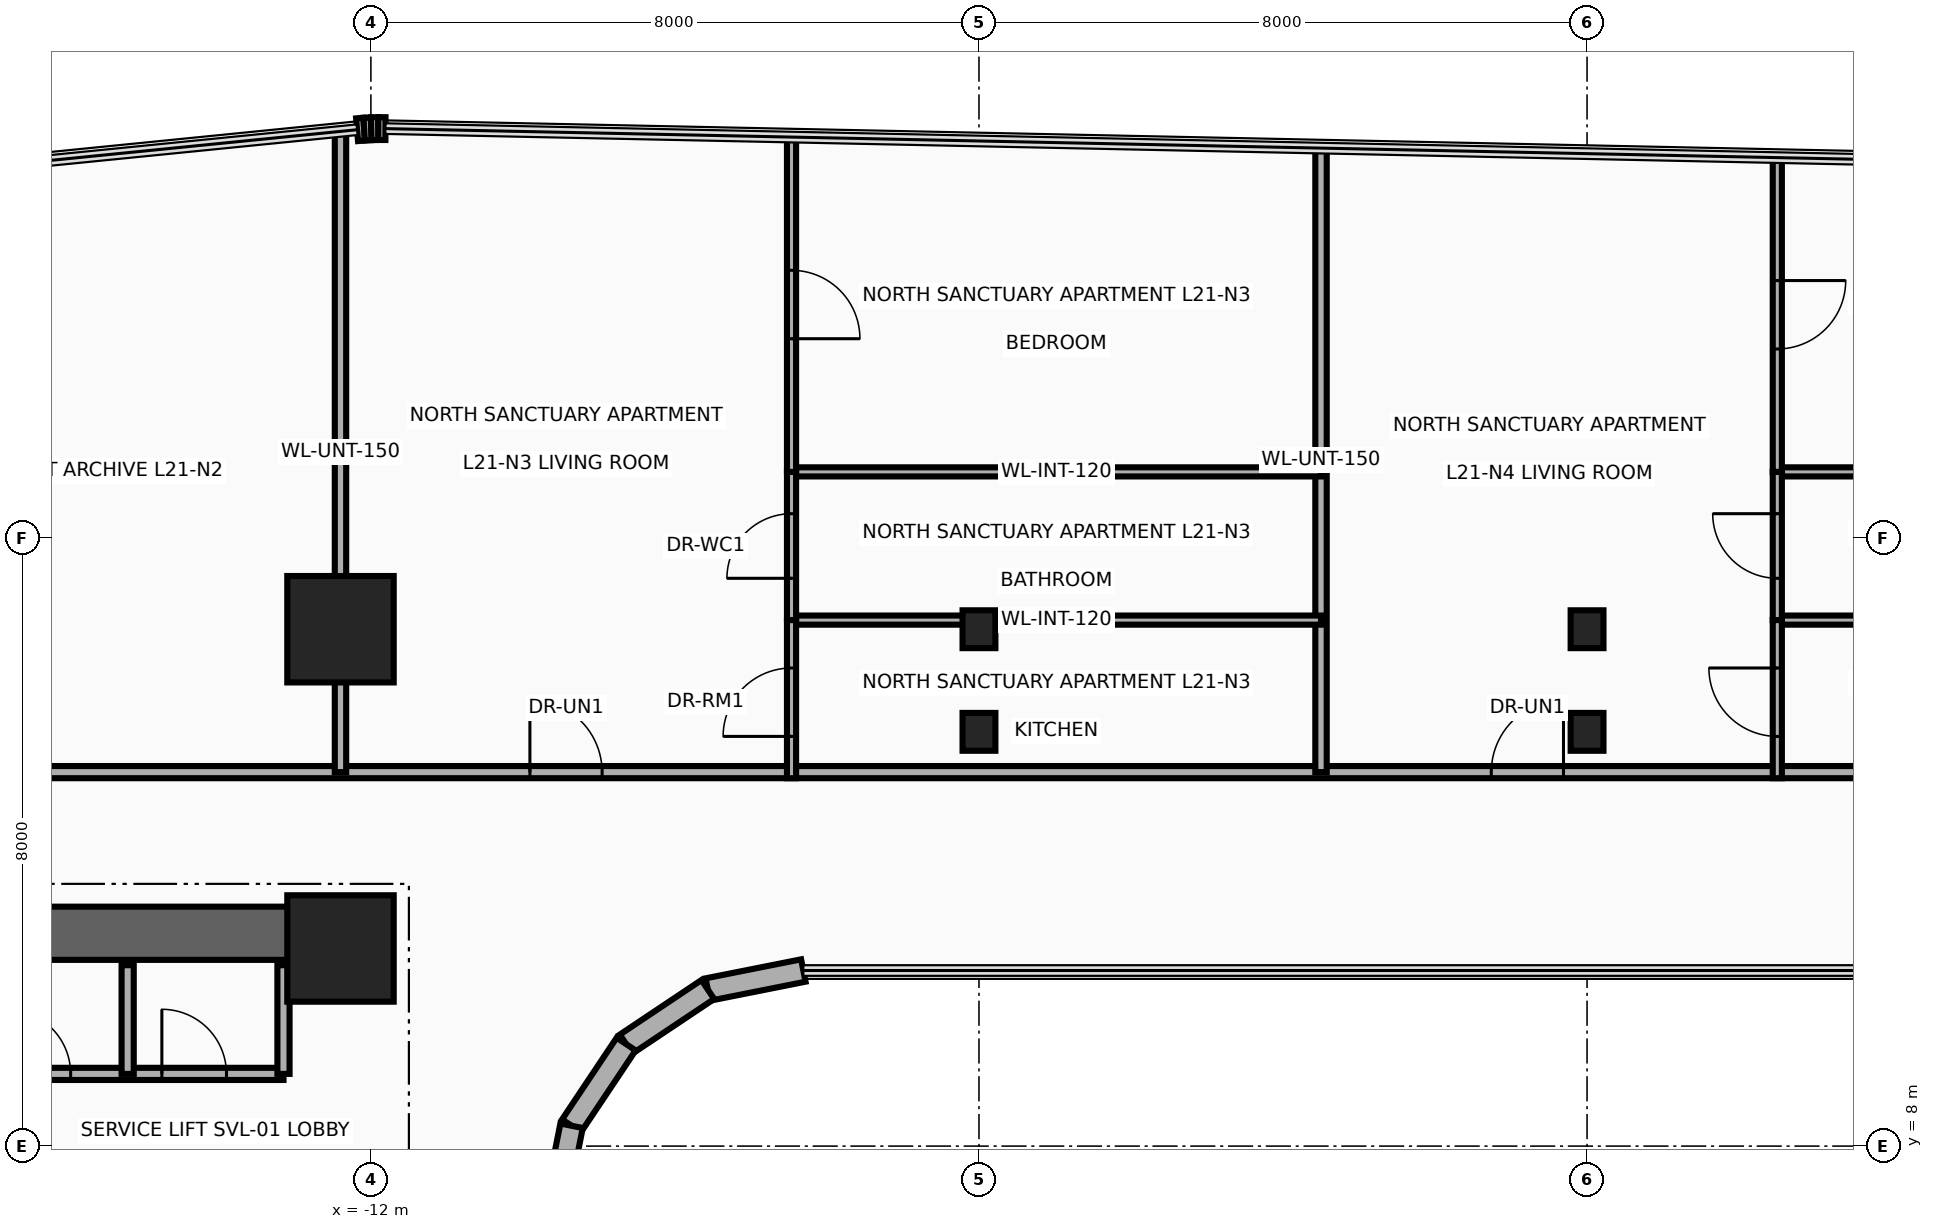
"""IFC4 building model, lengths in metres.
Left out: names, types, materials, properties, quantities, classifications, styles, units other than length and angle.
Written with IfcOpenShell. Run it as: python <this file> out.ifc"""

import sys

from ifc_helpers import new_model, si_unit, direction, frame, frame_2d, origin, origin_2d, place, context, subcontext, project, spatial, rectangle, i_section, extrude, source, transform, mapped, element, fill, save


model = new_model("IFC4")
c1 = context("Model", 3, precision=1e-05, world=origin(), true_north=direction((0.0, 1.0)))
c2 = subcontext(c1, "Body", "Model", "MODEL_VIEW")
j1 = project(units=[si_unit("LENGTHUNIT", "METRE"), si_unit("PLANEANGLEUNIT", "RADIAN")], contexts=[c1])
p1 = place(None, origin())
s1 = spatial("IfcSite", under=j1, at=p1, CompositionType="ELEMENT")
p2 = place(p1, origin())
s2 = spatial("IfcBuilding", under=s1, at=p2, CompositionType="ELEMENT")
p3 = place(p2, frame((0.0, 0.0, 85.2)))
s3 = spatial("IfcBuildingStorey", under=s2, at=p3, CompositionType="ELEMENT", Elevation=85.2)
p4 = place(p3, frame((-22.65, 10.8, 0.0), z_axis=(0.0, 0.0, 1.0), x_axis=(1.0, 0.0, 0.0)))
e1 = element("IfcWall", 1, at=p4, inside=s3, PredefinedType="SHEAR", context=c2, shape_type="SweptSolid", body=[
    extrude(rectangle(XDim=10.25, YDim=0.7, at=frame_2d((5.125, 0.0))), origin(), (0.0, 0.0, 1.0), 3.46),
])
m1 = source(origin(), c2, "Body", "SweptSolid", [
    extrude(rectangle(XDim=1.4, YDim=1.4, at=origin_2d()), origin(), (0.0, 0.0, 1.0), 3.7),
])
for number, where, z_axis, x_axis in (
    (2, (-12.4, 10.6, 0.0), (0.0, 0.0, 1.0), (1.0, 0.0, 0.0)),
    (3, (-12.4, 14.8, 0.0), (0.0, 0.0, 1.0), (1.0, 0.0, 0.0)),
):
    element("IfcColumn", number, at=place(p3, frame(where, z_axis=z_axis, x_axis=x_axis)), inside=s3, PredefinedType="COLUMN", context=c2, shape_type="MappedRepresentation", body=[
        mapped(m1, transform((0.0, 0.0, 0.0), x_axis=(1.0, 0.0, 0.0), y_axis=(0.0, 1.0, 0.0), z_axis=(0.0, 0.0, 1.0), scale=1.0)),
    ])
m2 = source(origin(), c2, "Body", "SweptSolid", [
    extrude(i_section(OverallWidth=0.432, OverallDepth=0.498, WebThickness=0.056, FlangeThickness=0.089, at=origin_2d()), origin(), (0.0, 0.0, 1.0), 3.7),
])
for number, where, z_axis, x_axis in (
    (4, (-4.0, 13.45, 0.0), (0.0, 0.0, 1.0), (1.0, 0.0, 0.0)),
    (5, (-4.0, 14.8, 0.0), (0.0, 0.0, 1.0), (1.0, 0.0, 0.0)),
    (6, (4.0, 13.45, 0.0), (0.0, 0.0, 1.0), (1.0, 0.0, 0.0)),
    (7, (4.0, 14.8, 0.0), (0.0, 0.0, 1.0), (1.0, 0.0, 0.0)),
):
    element("IfcColumn", number, at=place(p3, frame(where, z_axis=z_axis, x_axis=x_axis)), inside=s3, PredefinedType="COLUMN", context=c2, shape_type="MappedRepresentation", body=[
        mapped(m2, transform((0.0, 0.0, 0.0), x_axis=(1.0, 0.0, 0.0), y_axis=(0.0, 1.0, 0.0), z_axis=(0.0, 0.0, 1.0), scale=1.0)),
    ])
p5 = place(p3, frame((-12.182, 21.371, 0.0), z_axis=(0.0, 0.0, 1.0), x_axis=(0.996527790842, 0.08326080759, 0.0)))
e8 = element("IfcWall", 8, at=p5, inside=s3, PredefinedType="SOLIDWALL", context=c2, shape_type="SweptSolid", body=[
    extrude(rectangle(XDim=0.094, YDim=0.3, at=frame_2d((0.047, 0.0))), origin(), (0.0, 0.0, 1.0), 3.46),
])
p6 = place(p3, frame((-12.088, 21.379, 0.0), z_axis=(0.0, 0.0, 1.0), x_axis=(0.998476480444, 0.055178963393, 0.0)))
e9 = element("IfcWall", 9, at=p6, inside=s3, PredefinedType="SOLIDWALL", context=c2, shape_type="SweptSolid", body=[
    extrude(rectangle(XDim=0.093, YDim=0.3, at=frame_2d((0.046, 0.0))), origin(), (0.0, 0.0, 1.0), 3.46),
])
p7 = place(p3, frame((-11.996, 21.384, 0.0), z_axis=(0.0, 0.0, 1.0), x_axis=(0.999722573757, 0.023553673204, 0.0)))
e10 = element("IfcWall", 10, at=p7, inside=s3, PredefinedType="SOLIDWALL", context=c2, shape_type="SweptSolid", body=[
    extrude(rectangle(XDim=0.093, YDim=0.3, at=frame_2d((0.047, 0.0))), origin(), (0.0, 0.0, 1.0), 3.46),
])
p8 = place(p3, frame((-11.902, 21.386, 0.0), z_axis=(0.0, 0.0, 1.0), x_axis=(0.999986507273, -0.005194735103, 0.0)))
e11 = element("IfcWall", 11, at=p8, inside=s3, PredefinedType="SOLIDWALL", context=c2, shape_type="SweptSolid", body=[
    extrude(rectangle(XDim=0.094, YDim=0.3, at=frame_2d((0.047, 0.0))), origin(), (0.0, 0.0, 1.0), 3.46),
])
p9 = place(p3, frame((-6.311, 10.31, 0.0), z_axis=(0.0, 0.0, 1.0), x_axis=(-0.980778058848, -0.195126623715, 0.0)))
e12 = element("IfcWall", 12, at=p9, inside=s3, PredefinedType="SOLIDWALL", context=c2, shape_type="SweptSolid", body=[
    extrude(rectangle(XDim=1.281, YDim=0.3, at=frame_2d((0.641, 0.0))), origin(), (0.0, 0.0, 1.0), 3.46),
])
p10 = place(p3, frame((-7.567, 10.06, 0.0), z_axis=(0.0, 0.0, 1.0), x_axis=(-0.831497739511, -0.555528135371, 0.0)))
e13 = element("IfcWall", 13, at=p10, inside=s3, PredefinedType="SOLIDWALL", context=c2, shape_type="SweptSolid", body=[
    extrude(rectangle(XDim=1.292, YDim=0.3, at=frame_2d((0.646, 0.0))), origin(), (0.0, 0.0, 1.0), 3.46),
])
p11 = place(p3, frame((-8.642, 9.342, 0.0), z_axis=(0.0, 0.0, 1.0), x_axis=(-0.555615398575, -0.831439431869, 0.0)))
e14 = element("IfcWall", 14, at=p11, inside=s3, PredefinedType="SOLIDWALL", context=c2, shape_type="SweptSolid", body=[
    extrude(rectangle(XDim=1.292, YDim=0.3, at=frame_2d((0.646, 0.0))), origin(), (0.0, 0.0, 1.0), 3.46),
])
p12 = place(p3, frame((-9.36, 8.268, 0.0), z_axis=(0.0, 0.0, 1.0), x_axis=(-0.195090163074, -0.980785312019, 0.0)))
e15 = element("IfcWall", 15, at=p12, inside=s3, PredefinedType="SOLIDWALL", context=c2, shape_type="SweptSolid", body=[
    extrude(rectangle(XDim=1.281, YDim=0.3, at=frame_2d((0.641, 0.0))), origin(), (0.0, 0.0, 1.0), 3.46),
])
p13 = place(p3, frame((-18.65, 8.95, 0.0), z_axis=(0.0, 0.0, 1.0), x_axis=(1.0, 0.0, 0.0)))
e16 = element("IfcWall", 16, at=p13, inside=s3, PredefinedType="PARTITIONING", context=c2, shape_type="SweptSolid", body=[
    extrude(rectangle(XDim=5.5, YDim=0.16, at=frame_2d((2.75, 0.0))), origin(), (0.0, 0.0, 1.0), 3.46),
])
p14 = place(p13, frame((0.3, 0.0, 0.0)))
e17 = element("IfcOpeningElement", 17, at=p14, cuts=e16, PredefinedType="OPENING", context=c2, shape_type="SweptSolid", body=[
    extrude(rectangle(XDim=0.85, YDim=2.05, at=frame_2d((0.425, 1.025))), frame((0.0, 0.095, 0.0), z_axis=(0.0, -1.0, 0.0), x_axis=(1.0, 0.0, 0.0)), (0.0, 0.0, 1.0), 0.19),
])
p15 = place(p13, frame((1.85, 0.0, 0.0)))
e18 = element("IfcOpeningElement", 18, at=p15, cuts=e16, PredefinedType="OPENING", context=c2, shape_type="SweptSolid", body=[
    extrude(rectangle(XDim=0.85, YDim=2.05, at=frame_2d((0.425, 1.025))), frame((0.0, 0.095, 0.0), z_axis=(0.0, -1.0, 0.0), x_axis=(1.0, 0.0, 0.0)), (0.0, 0.0, 1.0), 0.19),
])
p16 = place(p13, frame((3.9, 0.0, 0.0)))
e19 = element("IfcOpeningElement", 19, at=p16, cuts=e16, PredefinedType="OPENING", context=c2, shape_type="SweptSolid", body=[
    extrude(rectangle(XDim=0.85, YDim=2.05, at=frame_2d((0.425, 1.025))), frame((0.0, 0.095, 0.0), z_axis=(0.0, -1.0, 0.0), x_axis=(1.0, 0.0, 0.0)), (0.0, 0.0, 1.0), 0.19),
])
for number, where, z_axis, x_axis in (
    (20, (-13.15, 8.95, 0.0), (0.0, 0.0, 1.0), (0.0, 1.0, 0.0)),
    (21, (-15.2, 8.95, 0.0), (0.0, 0.0, 1.0), (0.0, 1.0, 0.0)),
):
    element("IfcWall", number, at=place(p3, frame(where, z_axis=z_axis, x_axis=x_axis)), inside=s3, PredefinedType="PARTITIONING", context=c2, shape_type="SweptSolid", body=[
        extrude(rectangle(XDim=1.43, YDim=0.16, at=frame_2d((0.715, 0.0))), origin(), (0.0, 0.0, 1.0), 3.46),
    ])
p17 = place(p3, frame((-33.54, 12.92, 0.0), z_axis=(0.0, 0.0, 1.0), x_axis=(1.0, 0.0, 0.0)))
e22 = element("IfcWall", 22, at=p17, inside=s3, PredefinedType="PARTITIONING", context=c2, shape_type="SweptSolid", body=[
    extrude(rectangle(XDim=47.09, YDim=0.16, at=frame_2d((23.545, 0.0))), origin(), (0.0, 0.0, 1.0), 2.583),
])
p18 = place(p17, frame((4.48, 0.0, 0.0)))
e23 = element("IfcOpeningElement", 23, at=p18, cuts=e22, PredefinedType="OPENING", context=c2, shape_type="SweptSolid", body=[
    extrude(rectangle(XDim=1.8, YDim=2.15, at=frame_2d((0.9, 1.075))), frame((0.0, 0.095, 0.0), z_axis=(0.0, -1.0, 0.0), x_axis=(1.0, 0.0, 0.0)), (0.0, 0.0, 1.0), 0.19),
])
p19 = place(p17, frame((15.355, 0.0, 0.0)))
e24 = element("IfcOpeningElement", 24, at=p19, cuts=e22, PredefinedType="OPENING", context=c2, shape_type="SweptSolid", body=[
    extrude(rectangle(XDim=0.9, YDim=2.1, at=frame_2d((0.45, 1.05))), frame((0.0, 0.095, 0.0), z_axis=(0.0, -1.0, 0.0), x_axis=(1.0, 0.0, 0.0)), (0.0, 0.0, 1.0), 0.19),
])
p20 = place(p17, frame((23.632, 0.0, 0.0)))
e25 = element("IfcOpeningElement", 25, at=p20, cuts=e22, PredefinedType="OPENING", context=c2, shape_type="SweptSolid", body=[
    extrude(rectangle(XDim=0.95, YDim=2.15, at=frame_2d((0.475, 1.075))), frame((0.0, 0.095, 0.0), z_axis=(0.0, -1.0, 0.0), x_axis=(1.0, 0.0, 0.0)), (0.0, 0.0, 1.0), 0.19),
])
p21 = place(p17, frame((36.28, 0.0, 0.0)))
e26 = element("IfcOpeningElement", 26, at=p21, cuts=e22, PredefinedType="OPENING", context=c2, shape_type="SweptSolid", body=[
    extrude(rectangle(XDim=0.95, YDim=2.15, at=frame_2d((0.475, 1.075))), frame((0.0, 0.095, 0.0), z_axis=(0.0, -1.0, 0.0), x_axis=(1.0, 0.0, 0.0)), (0.0, 0.0, 1.0), 0.19),
])
p22 = place(p3, frame((-12.4, 12.92, 0.0), z_axis=(0.0, 0.0, 1.0), x_axis=(0.0, 1.0, 0.0)))
e27 = element("IfcWall", 27, at=p22, inside=s3, PredefinedType="PARTITIONING", context=c2, shape_type="SweptSolid", body=[
    extrude(rectangle(XDim=8.43, YDim=0.15, at=frame_2d((4.215, 0.0))), origin(), (0.0, 0.0, 1.0), 2.583),
])
p23 = place(p3, frame((0.5, 12.92, 0.0), z_axis=(0.0, 0.0, 1.0), x_axis=(0.0, 1.0, 0.0)))
e28 = element("IfcWall", 28, at=p23, inside=s3, PredefinedType="PARTITIONING", context=c2, shape_type="SweptSolid", body=[
    extrude(rectangle(XDim=8.21, YDim=0.15, at=frame_2d((4.105, 0.0))), origin(), (0.0, 0.0, 1.0), 2.583),
])
p24 = place(p3, frame((-6.466, 14.92, 0.0), z_axis=(0.0, 0.0, 1.0), x_axis=(1.0, 0.0, 0.0)))
e29 = element("IfcWall", 29, at=p24, inside=s3, PredefinedType="PARTITIONING", context=c2, shape_type="SweptSolid", body=[
    extrude(rectangle(XDim=6.966, YDim=0.12, at=frame_2d((3.483, 0.0))), origin(), (0.0, 0.0, 1.0), 2.583),
])
p25 = place(p3, frame((-6.466, 16.87, 0.0), z_axis=(0.0, 0.0, 1.0), x_axis=(1.0, 0.0, 0.0)))
e30 = element("IfcWall", 30, at=p25, inside=s3, PredefinedType="PARTITIONING", context=c2, shape_type="SweptSolid", body=[
    extrude(rectangle(XDim=6.966, YDim=0.12, at=frame_2d((3.483, 0.0))), origin(), (0.0, 0.0, 1.0), 3.46),
])
p26 = place(p3, frame((-6.466, 14.92, 0.0), z_axis=(0.0, 0.0, 1.0), x_axis=(0.0, 1.0, 0.0)))
e31 = element("IfcWall", 31, at=p26, inside=s3, PredefinedType="PARTITIONING", context=c2, shape_type="SweptSolid", body=[
    extrude(rectangle(XDim=1.95, YDim=0.12, at=frame_2d((0.975, 0.0))), origin(), (0.0, 0.0, 1.0), 2.583),
])
p27 = place(p26, frame((0.55, 0.0, 0.0)))
e32 = element("IfcOpeningElement", 32, at=p27, cuts=e31, PredefinedType="OPENING", context=c2, shape_type="SweptSolid", body=[
    extrude(rectangle(XDim=0.85, YDim=2.1, at=frame_2d((0.425, 1.05))), frame((0.0, 0.075, 0.0), z_axis=(0.0, -1.0, 0.0), x_axis=(1.0, 0.0, 0.0)), (0.0, 0.0, 1.0), 0.15),
])
p28 = place(p3, frame((-6.466, 12.84, 0.0), z_axis=(0.0, 0.0, 1.0), x_axis=(0.0, 1.0, 0.0)))
e33 = element("IfcWall", 33, at=p28, inside=s3, PredefinedType="PARTITIONING", context=c2, shape_type="SweptSolid", body=[
    extrude(rectangle(XDim=2.08, YDim=0.12, at=frame_2d((1.04, 0.0))), origin(), (0.0, 0.0, 1.0), 2.583),
])
p29 = place(p28, frame((0.55, 0.0, 0.0)))
e34 = element("IfcOpeningElement", 34, at=p29, cuts=e33, PredefinedType="OPENING", context=c2, shape_type="SweptSolid", body=[
    extrude(rectangle(XDim=0.9, YDim=2.1, at=frame_2d((0.45, 1.05))), frame((0.0, 0.075, 0.0), z_axis=(0.0, -1.0, 0.0), x_axis=(1.0, 0.0, 0.0)), (0.0, 0.0, 1.0), 0.15),
])
p30 = place(p3, frame((-6.466, 16.87, 0.0), z_axis=(0.0, 0.0, 1.0), x_axis=(0.0, 1.0, 0.0)))
e35 = element("IfcWall", 35, at=p30, inside=s3, PredefinedType="PARTITIONING", context=c2, shape_type="SweptSolid", body=[
    extrude(rectangle(XDim=4.405, YDim=0.12, at=frame_2d((2.202, 0.0))), origin(), (0.0, 0.0, 1.0), 3.46),
])
p31 = place(p30, frame((1.752, 0.0, 0.0)))
e36 = element("IfcOpeningElement", 36, at=p31, cuts=e35, PredefinedType="OPENING", context=c2, shape_type="SweptSolid", body=[
    extrude(rectangle(XDim=0.9, YDim=2.1, at=frame_2d((0.45, 1.05))), frame((0.0, 0.075, 0.0), z_axis=(0.0, -1.0, 0.0), x_axis=(1.0, 0.0, 0.0)), (0.0, 0.0, 1.0), 0.15),
])
for number, where, z_axis, x_axis in (
    (37, (6.503, 14.92, 0.0), (0.0, 0.0, 1.0), (1.0, 0.0, 0.0)),
    (38, (6.503, 16.87, 0.0), (0.0, 0.0, 1.0), (1.0, 0.0, 0.0)),
):
    element("IfcWall", number, at=place(p3, frame(where, z_axis=z_axis, x_axis=x_axis)), inside=s3, PredefinedType="PARTITIONING", context=c2, shape_type="SweptSolid", body=[
        extrude(rectangle(XDim=7.047, YDim=0.12, at=frame_2d((3.523, 0.0))), origin(), (0.0, 0.0, 1.0), 3.46),
    ])
p32 = place(p3, frame((6.503, 14.92, 0.0), z_axis=(0.0, 0.0, 1.0), x_axis=(0.0, 1.0, 0.0)))
e39 = element("IfcWall", 39, at=p32, inside=s3, PredefinedType="PARTITIONING", context=c2, shape_type="SweptSolid", body=[
    extrude(rectangle(XDim=1.95, YDim=0.12, at=frame_2d((0.975, 0.0))), origin(), (0.0, 0.0, 1.0), 3.46),
])
p33 = place(p32, frame((0.55, 0.0, 0.0)))
e40 = element("IfcOpeningElement", 40, at=p33, cuts=e39, PredefinedType="OPENING", context=c2, shape_type="SweptSolid", body=[
    extrude(rectangle(XDim=0.85, YDim=2.1, at=frame_2d((0.425, 1.05))), frame((0.0, 0.075, 0.0), z_axis=(0.0, -1.0, 0.0), x_axis=(1.0, 0.0, 0.0)), (0.0, 0.0, 1.0), 0.15),
])
p34 = place(p3, frame((6.503, 12.84, 0.0), z_axis=(0.0, 0.0, 1.0), x_axis=(0.0, 1.0, 0.0)))
e41 = element("IfcWall", 41, at=p34, inside=s3, PredefinedType="PARTITIONING", context=c2, shape_type="SweptSolid", body=[
    extrude(rectangle(XDim=2.08, YDim=0.12, at=frame_2d((1.04, 0.0))), origin(), (0.0, 0.0, 1.0), 2.583),
])
p35 = place(p34, frame((0.55, 0.0, 0.0)))
e42 = element("IfcOpeningElement", 42, at=p35, cuts=e41, PredefinedType="OPENING", context=c2, shape_type="SweptSolid", body=[
    extrude(rectangle(XDim=0.9, YDim=2.1, at=frame_2d((0.45, 1.05))), frame((0.0, 0.075, 0.0), z_axis=(0.0, -1.0, 0.0), x_axis=(1.0, 0.0, 0.0)), (0.0, 0.0, 1.0), 0.15),
])
p36 = place(p3, frame((6.503, 16.87, 0.0), z_axis=(0.0, 0.0, 1.0), x_axis=(0.0, 1.0, 0.0)))
e43 = element("IfcWall", 43, at=p36, inside=s3, PredefinedType="PARTITIONING", context=c2, shape_type="SweptSolid", body=[
    extrude(rectangle(XDim=4.134, YDim=0.12, at=frame_2d((2.067, 0.0))), origin(), (0.0, 0.0, 1.0), 3.46),
])
p37 = place(p36, frame((1.617, 0.0, 0.0)))
e44 = element("IfcOpeningElement", 44, at=p37, cuts=e43, PredefinedType="OPENING", context=c2, shape_type="SweptSolid", body=[
    extrude(rectangle(XDim=0.9, YDim=2.1, at=frame_2d((0.45, 1.05))), frame((0.0, 0.075, 0.0), z_axis=(0.0, -1.0, 0.0), x_axis=(1.0, 0.0, 0.0)), (0.0, 0.0, 1.0), 0.15),
])
p38 = place(p15, origin())
e45 = element("IfcDoor", 45, at=p38, inside=s3, OperationType="SINGLE_SWING_RIGHT", PredefinedType="DOOR", context=c2, shape_type="SweptSolid", body=[
    extrude(rectangle(XDim=0.85, YDim=2.05, at=frame_2d((0.425, 1.025))), frame((0.0, 0.025, 0.0), z_axis=(0.0, -1.0, 0.0), x_axis=(1.0, 0.0, 0.0)), (0.0, 0.0, 1.0), 0.05),
])
fill(e18, e45)
p39 = place(p16, origin())
e46 = element("IfcDoor", 46, at=p39, inside=s3, OperationType="SINGLE_SWING_LEFT", PredefinedType="DOOR", context=c2, shape_type="SweptSolid", body=[
    extrude(rectangle(XDim=0.85, YDim=2.05, at=frame_2d((0.425, 1.025))), frame((0.0, 0.025, 0.0), z_axis=(0.0, -1.0, 0.0), x_axis=(1.0, 0.0, 0.0)), (0.0, 0.0, 1.0), 0.05),
])
fill(e19, e46)
p40 = place(p20, origin())
e47 = element("IfcDoor", 47, at=p40, inside=s3, OperationType="SINGLE_SWING_RIGHT", PredefinedType="DOOR", context=c2, shape_type="SweptSolid", body=[
    extrude(rectangle(XDim=0.95, YDim=2.15, at=frame_2d((0.475, 1.075))), frame((0.0, 0.025, 0.0), z_axis=(0.0, -1.0, 0.0), x_axis=(1.0, 0.0, 0.0)), (0.0, 0.0, 1.0), 0.05),
])
fill(e25, e47)
p41 = place(p27, origin())
e48 = element("IfcDoor", 48, at=p41, inside=s3, OperationType="SINGLE_SWING_LEFT", PredefinedType="DOOR", context=c2, shape_type="SweptSolid", body=[
    extrude(rectangle(XDim=0.85, YDim=2.1, at=frame_2d((0.425, 1.05))), frame((0.0, 0.025, 0.0), z_axis=(0.0, -1.0, 0.0), x_axis=(1.0, 0.0, 0.0)), (0.0, 0.0, 1.0), 0.05),
])
fill(e32, e48)
p42 = place(p29, origin())
e49 = element("IfcDoor", 49, at=p42, inside=s3, OperationType="SINGLE_SWING_RIGHT", PredefinedType="DOOR", context=c2, shape_type="SweptSolid", body=[
    extrude(rectangle(XDim=0.9, YDim=2.1, at=frame_2d((0.45, 1.05))), frame((0.0, 0.025, 0.0), z_axis=(0.0, -1.0, 0.0), x_axis=(1.0, 0.0, 0.0)), (0.0, 0.0, 1.0), 0.05),
])
fill(e34, e49)
p43 = place(p31, frame((0.9, 0.0, 0.0), z_axis=(0.0, 0.0, 1.0), x_axis=(-1.0, 0.0, 0.0)))
e50 = element("IfcDoor", 50, at=p43, inside=s3, OperationType="SINGLE_SWING_LEFT", PredefinedType="DOOR", context=c2, shape_type="SweptSolid", body=[
    extrude(rectangle(XDim=0.9, YDim=2.1, at=frame_2d((0.45, 1.05))), frame((0.0, 0.025, 0.0), z_axis=(0.0, -1.0, 0.0), x_axis=(1.0, 0.0, 0.0)), (0.0, 0.0, 1.0), 0.05),
])
fill(e36, e50)
p44 = place(p21, origin())
e51 = element("IfcDoor", 51, at=p44, inside=s3, OperationType="SINGLE_SWING_RIGHT", PredefinedType="DOOR", context=c2, shape_type="SweptSolid", body=[
    extrude(rectangle(XDim=0.95, YDim=2.15, at=frame_2d((0.475, 1.075))), frame((0.0, 0.025, 0.0), z_axis=(0.0, -1.0, 0.0), x_axis=(1.0, 0.0, 0.0)), (0.0, 0.0, 1.0), 0.05),
])
fill(e26, e51)
p45 = place(p33, origin())
e52 = element("IfcDoor", 52, at=p45, inside=s3, OperationType="SINGLE_SWING_LEFT", PredefinedType="DOOR", context=c2, shape_type="SweptSolid", body=[
    extrude(rectangle(XDim=0.85, YDim=2.1, at=frame_2d((0.425, 1.05))), frame((0.0, 0.025, 0.0), z_axis=(0.0, -1.0, 0.0), x_axis=(1.0, 0.0, 0.0)), (0.0, 0.0, 1.0), 0.05),
])
fill(e40, e52)
p46 = place(p35, origin())
e53 = element("IfcDoor", 53, at=p46, inside=s3, OperationType="SINGLE_SWING_RIGHT", PredefinedType="DOOR", context=c2, shape_type="SweptSolid", body=[
    extrude(rectangle(XDim=0.9, YDim=2.1, at=frame_2d((0.45, 1.05))), frame((0.0, 0.025, 0.0), z_axis=(0.0, -1.0, 0.0), x_axis=(1.0, 0.0, 0.0)), (0.0, 0.0, 1.0), 0.05),
])
fill(e42, e53)
p47 = place(p37, frame((0.9, 0.0, 0.0), z_axis=(0.0, 0.0, 1.0), x_axis=(-1.0, 0.0, 0.0)))
e54 = element("IfcDoor", 54, at=p47, inside=s3, OperationType="SINGLE_SWING_LEFT", PredefinedType="DOOR", context=c2, shape_type="SweptSolid", body=[
    extrude(rectangle(XDim=0.9, YDim=2.1, at=frame_2d((0.45, 1.05))), frame((0.0, 0.025, 0.0), z_axis=(0.0, -1.0, 0.0), x_axis=(1.0, 0.0, 0.0)), (0.0, 0.0, 1.0), 0.05),
])
fill(e44, e54)
save(model, sys.argv[1])
